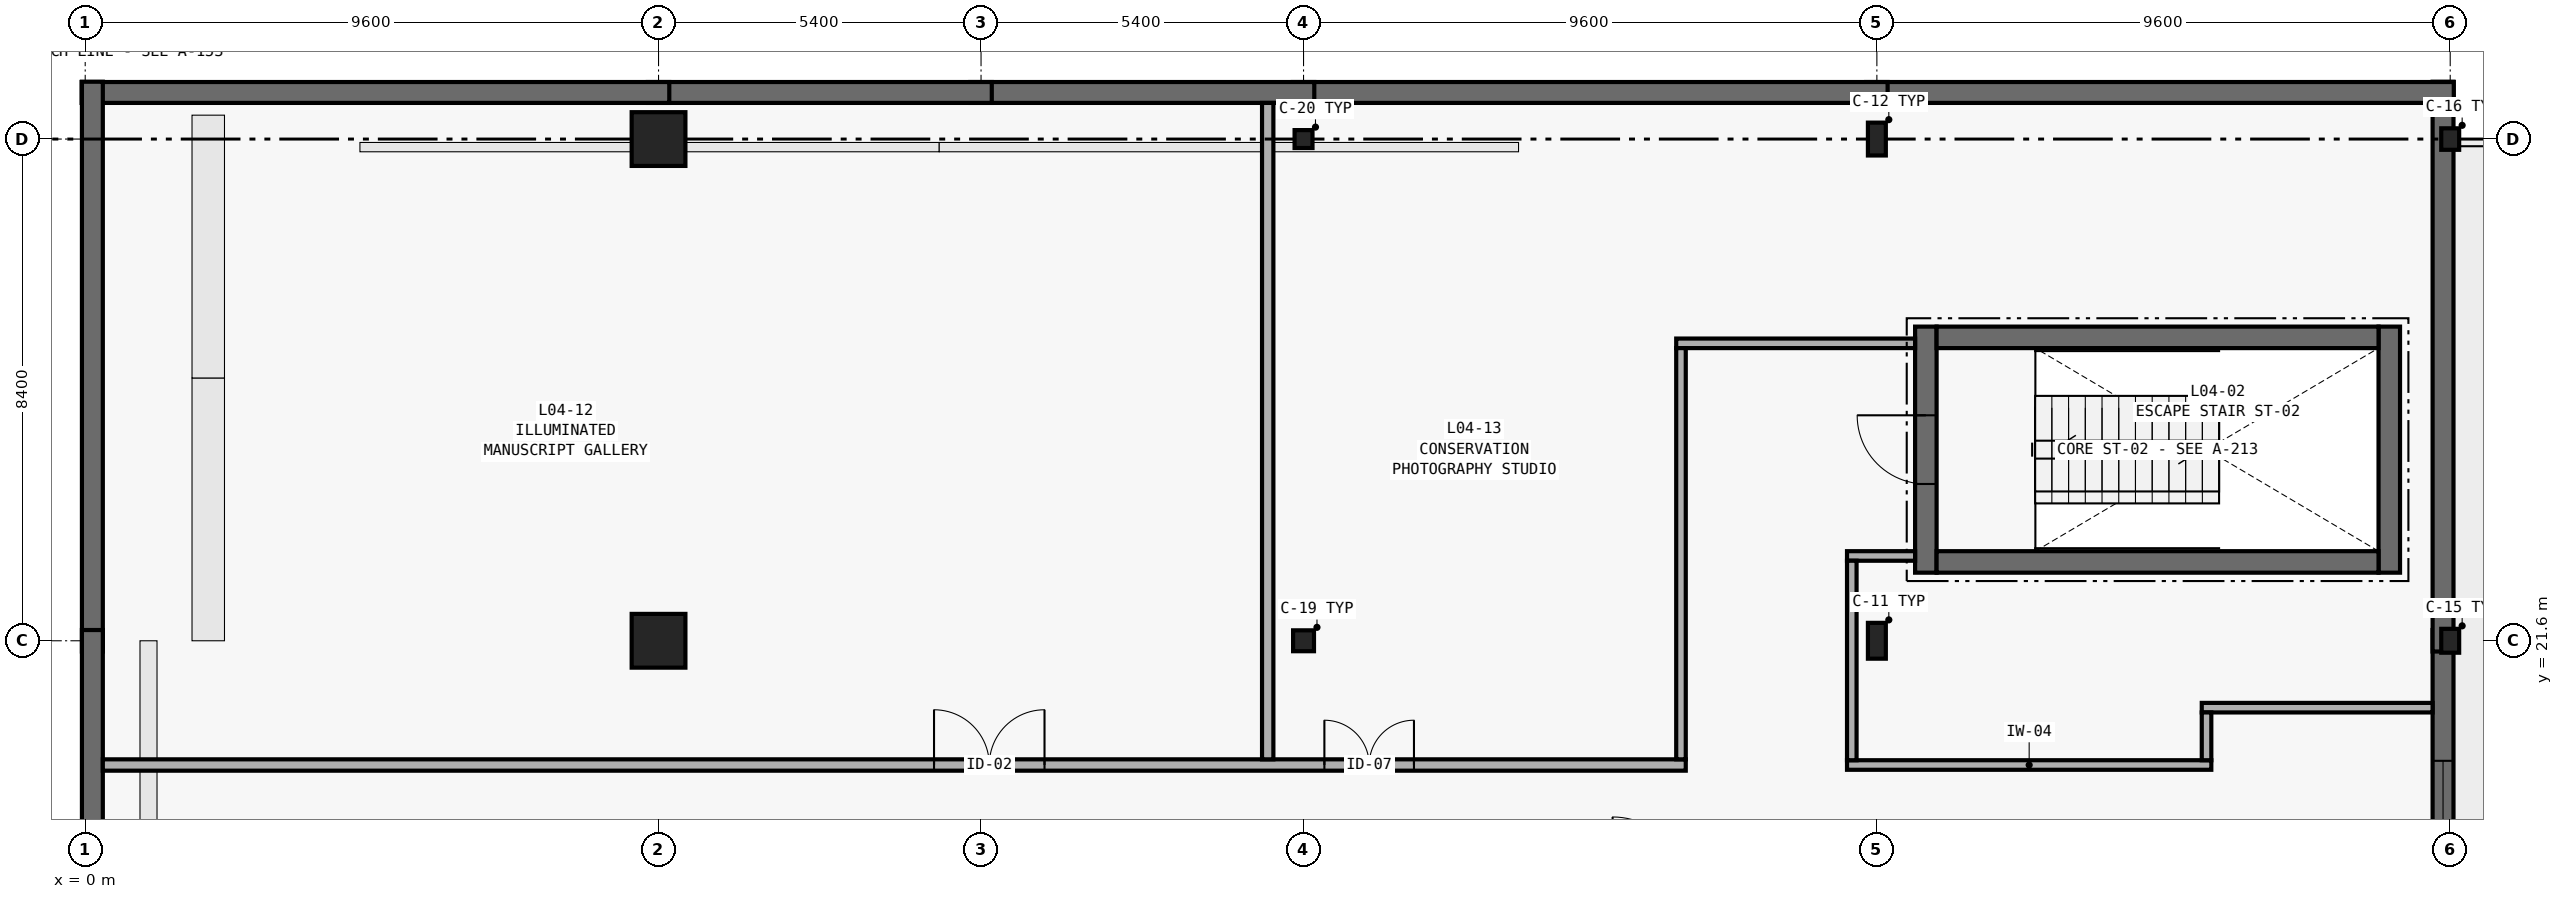
"""IFC4 building model, lengths in metres.
Left out: names, types, materials, properties, quantities, classifications, styles, units other than length and angle.
Written with IfcOpenShell. Run it as: python <this file> out.ifc"""

import sys

from ifc_helpers import new_model, si_unit, direction, frame, frame_2d, origin, origin_2d, place, context, subcontext, project, spatial, rectangle, hollow_rectangle, i_section, extrude, element, fill, save


model = new_model("IFC4")
c1 = context("Model", 3, precision=1e-05, world=origin(), true_north=direction((0.0, 1.0)))
c2 = subcontext(c1, "Body", "Model", "MODEL_VIEW")
j1 = project(units=[si_unit("LENGTHUNIT", "METRE"), si_unit("PLANEANGLEUNIT", "RADIAN")], contexts=[c1])
p1 = place(None, origin())
s1 = spatial("IfcSite", under=j1, at=p1, CompositionType="ELEMENT")
p2 = place(p1, origin())
s2 = spatial("IfcBuilding", under=s1, at=p2, CompositionType="ELEMENT")
p3 = place(p2, frame((0.0, 0.0, 21.3)))
s3 = spatial("IfcBuildingStorey", under=s2, at=p3, CompositionType="ELEMENT", Elevation=21.3)
for number, where, z_axis, x_axis in (
    (1, (9.6, 21.6, 0.0), (0.0, 0.0, 1.0), (1.0, 0.0, 0.0)),
    (2, (9.6, 30.0, 0.0), (0.0, 0.0, 1.0), (1.0, 0.0, 0.0)),
):
    element("IfcColumn", number, at=place(p3, frame(where, z_axis=z_axis, x_axis=x_axis)), inside=s3, PredefinedType="COLUMN", context=c2, shape_type="SweptSolid", body=[
        extrude(rectangle(XDim=0.9, YDim=0.9, at=origin_2d()), origin(), (0.0, 0.0, 1.0), 4.2),
    ])
p4 = place(p3, frame((20.4, 21.6, 0.0), z_axis=(0.0, 0.0, 1.0), x_axis=(1.0, 0.0, 0.0)))
e3 = element("IfcColumn", 3, at=p4, inside=s3, PredefinedType="COLUMN", context=c2, shape_type="SweptSolid", body=[
    extrude(hollow_rectangle(XDim=0.35, YDim=0.35, WallThickness=0.016, at=origin_2d()), origin(), (0.0, 0.0, 1.0), 4.2),
])
p5 = place(p3, frame((20.4, 30.0, 0.0), z_axis=(0.0, 0.0, 1.0), x_axis=(1.0, 0.0, 0.0)))
e4 = element("IfcColumn", 4, at=p5, inside=s3, PredefinedType="COLUMN", context=c2, shape_type="SweptSolid", body=[
    extrude(hollow_rectangle(XDim=0.3, YDim=0.3, WallThickness=0.016, at=origin_2d()), origin(), (0.0, 0.0, 1.0), 4.2),
])
p6 = place(p3, frame((30.0, 21.6, 0.0), z_axis=(0.0, 0.0, 1.0), x_axis=(1.0, 0.0, 0.0)))
e5 = element("IfcColumn", 5, at=p6, inside=s3, PredefinedType="COLUMN", context=c2, shape_type="SweptSolid", body=[
    extrude(i_section(OverallWidth=0.3, OverallDepth=0.6, WebThickness=0.015, FlangeThickness=0.03, FilletRadius=0.027, at=origin_2d()), origin(), (0.0, 0.0, 1.0), 4.2),
])
p7 = place(p3, frame((30.0, 30.0, 0.0), z_axis=(0.0, 0.0, 1.0), x_axis=(1.0, 0.0, 0.0)))
e6 = element("IfcColumn", 6, at=p7, inside=s3, PredefinedType="COLUMN", context=c2, shape_type="SweptSolid", body=[
    extrude(i_section(OverallWidth=0.3, OverallDepth=0.55, WebThickness=0.015, FlangeThickness=0.029, FilletRadius=0.027, at=origin_2d()), origin(), (0.0, 0.0, 1.0), 4.2),
])
p8 = place(p3, frame((39.6, 21.6, 0.0), z_axis=(0.0, 0.0, 1.0), x_axis=(1.0, 0.0, 0.0)))
e7 = element("IfcColumn", 7, at=p8, inside=s3, PredefinedType="COLUMN", context=c2, shape_type="SweptSolid", body=[
    extrude(i_section(OverallWidth=0.3, OverallDepth=0.4, WebThickness=0.013, FlangeThickness=0.024, FilletRadius=0.027, at=origin_2d()), origin(), (0.0, 0.0, 1.0), 4.2),
])
p9 = place(p3, frame((39.6, 30.0, 0.0), z_axis=(0.0, 0.0, 1.0), x_axis=(1.0, 0.0, 0.0)))
e8 = element("IfcColumn", 8, at=p9, inside=s3, PredefinedType="COLUMN", context=c2, shape_type="SweptSolid", body=[
    extrude(i_section(OverallWidth=0.3, OverallDepth=0.36, WebThickness=0.012, FlangeThickness=0.022, FilletRadius=0.027, at=origin_2d()), origin(), (0.0, 0.0, 1.0), 4.2),
])
p10 = place(p3, frame((39.48, 9.42, 0.0), z_axis=(0.0, 0.0, 1.0), x_axis=(0.0, 1.0, 0.0)))
e9 = element("IfcWall", 9, at=p10, inside=s3, PredefinedType="STANDARD", context=c2, shape_type="SweptSolid", body=[
    extrude(rectangle(XDim=12.36, YDim=0.35, at=frame_2d((6.18, 0.0))), origin(), (0.0, 0.0, 1.0), 3.9),
])
p11 = place(p10, frame((3.69, 0.0, 0.9)))
e10 = element("IfcOpeningElement", 10, at=p11, cuts=e9, PredefinedType="OPENING", context=c2, shape_type="SweptSolid", body=[
    extrude(rectangle(XDim=1.8, YDim=1.1, at=frame_2d((0.9, 0.55))), frame((0.0, 0.19, 0.0), z_axis=(0.0, -1.0, 0.0), x_axis=(1.0, 0.0, 0.0)), (0.0, 0.0, 1.0), 0.38),
])
p12 = place(p10, frame((8.37, 0.0, 0.9)))
e11 = element("IfcOpeningElement", 11, at=p12, cuts=e9, PredefinedType="OPENING", context=c2, shape_type="SweptSolid", body=[
    extrude(rectangle(XDim=1.8, YDim=1.1, at=frame_2d((0.9, 0.55))), frame((0.0, 0.19, 0.0), z_axis=(0.0, -1.0, 0.0), x_axis=(1.0, 0.0, 0.0)), (0.0, 0.0, 1.0), 0.38),
])
p13 = place(p3, frame((39.48, 21.42, 0.0), z_axis=(0.0, 0.0, 1.0), x_axis=(0.0, 1.0, 0.0)))
e12 = element("IfcWall", 12, at=p13, inside=s3, PredefinedType="STANDARD", context=c2, shape_type="SweptSolid", body=[
    extrude(rectangle(XDim=9.54, YDim=0.35, at=frame_2d((4.77, 0.0))), origin(), (0.0, 0.0, 1.0), 3.9),
])
p14 = place(p3, frame((39.66, 30.78, 0.0), z_axis=(0.0, 0.0, 1.0), x_axis=(-1.0, 0.0, 0.0)))
e13 = element("IfcWall", 13, at=p14, inside=s3, PredefinedType="STANDARD", context=c2, shape_type="SweptSolid", body=[
    extrude(rectangle(XDim=9.84, YDim=0.35, at=frame_2d((4.92, 0.0))), origin(), (0.0, 0.0, 1.0), 3.9),
])
p15 = place(p3, frame((30.18, 30.78, 0.0), z_axis=(0.0, 0.0, 1.0), x_axis=(-1.0, 0.0, 0.0)))
e14 = element("IfcWall", 14, at=p15, inside=s3, PredefinedType="STANDARD", context=c2, shape_type="SweptSolid", body=[
    extrude(rectangle(XDim=9.96, YDim=0.35, at=frame_2d((4.98, 0.0))), origin(), (0.0, 0.0, 1.0), 3.9),
])
for number, where, z_axis, x_axis in (
    (15, (20.58, 30.78, 0.0), (0.0, 0.0, 1.0), (-1.0, 0.0, 0.0)),
    (16, (15.18, 30.78, 0.0), (0.0, 0.0, 1.0), (-1.0, 0.0, 0.0)),
):
    element("IfcWall", number, at=place(p3, frame(where, z_axis=z_axis, x_axis=x_axis)), inside=s3, PredefinedType="STANDARD", context=c2, shape_type="SweptSolid", body=[
        extrude(rectangle(XDim=5.76, YDim=0.35, at=frame_2d((2.88, 0.0))), origin(), (0.0, 0.0, 1.0), 3.9),
    ])
p16 = place(p3, frame((9.78, 30.78, 0.0), z_axis=(0.0, 0.0, 1.0), x_axis=(-1.0, 0.0, 0.0)))
e17 = element("IfcWall", 17, at=p16, inside=s3, PredefinedType="STANDARD", context=c2, shape_type="SweptSolid", body=[
    extrude(rectangle(XDim=9.84, YDim=0.35, at=frame_2d((4.92, 0.0))), origin(), (0.0, 0.0, 1.0), 3.9),
])
p17 = place(p3, frame((0.12, 30.96, 0.0), z_axis=(0.0, 0.0, 1.0), x_axis=(0.0, -1.0, 0.0)))
e18 = element("IfcWall", 18, at=p17, inside=s3, PredefinedType="STANDARD", context=c2, shape_type="SweptSolid", body=[
    extrude(rectangle(XDim=9.54, YDim=0.35, at=frame_2d((4.77, 0.0))), origin(), (0.0, 0.0, 1.0), 3.9),
])
p18 = place(p3, frame((0.12, 21.78, 0.0), z_axis=(0.0, 0.0, 1.0), x_axis=(0.0, -1.0, 0.0)))
e19 = element("IfcWall", 19, at=p18, inside=s3, PredefinedType="STANDARD", context=c2, shape_type="SweptSolid", body=[
    extrude(rectangle(XDim=12.36, YDim=0.35, at=frame_2d((6.18, 0.0))), origin(), (0.0, 0.0, 1.0), 3.9),
])
p19 = place(p3, frame((30.82, 22.74, 0.0), z_axis=(0.0, 0.0, 1.0), x_axis=(0.0, 1.0, 0.0)))
e20 = element("IfcWall", 20, at=p19, inside=s3, PredefinedType="SHEAR", context=c2, shape_type="SweptSolid", body=[
    extrude(rectangle(XDim=4.12, YDim=0.36, at=frame_2d((2.06, 0.0))), origin(), (0.0, 0.0, 1.0), 3.95),
])
p20 = place(p19, frame((1.485, 0.0, 0.0)))
e21 = element("IfcOpeningElement", 21, at=p20, cuts=e20, PredefinedType="OPENING", context=c2, shape_type="SweptSolid", body=[
    extrude(rectangle(XDim=1.15, YDim=2.15, at=frame_2d((0.575, 1.075))), frame((0.0, 0.195, 0.0), z_axis=(0.0, -1.0, 0.0), x_axis=(1.0, 0.0, 0.0)), (0.0, 0.0, 1.0), 0.39),
])
p21 = place(p3, frame((38.58, 22.74, 0.0), z_axis=(0.0, 0.0, 1.0), x_axis=(0.0, 1.0, 0.0)))
e22 = element("IfcWall", 22, at=p21, inside=s3, PredefinedType="SHEAR", context=c2, shape_type="SweptSolid", body=[
    extrude(rectangle(XDim=4.12, YDim=0.36, at=frame_2d((2.06, 0.0))), origin(), (0.0, 0.0, 1.0), 3.95),
])
for number, where, z_axis, x_axis in (
    (23, (31.0, 26.68, 0.0), (0.0, 0.0, 1.0), (1.0, 0.0, 0.0)),
    (24, (31.0, 22.92, 0.0), (0.0, 0.0, 1.0), (1.0, 0.0, 0.0)),
):
    element("IfcWall", number, at=place(p3, frame(where, z_axis=z_axis, x_axis=x_axis)), inside=s3, PredefinedType="SHEAR", context=c2, shape_type="SweptSolid", body=[
        extrude(rectangle(XDim=7.4, YDim=0.36, at=frame_2d((3.7, 0.0))), origin(), (0.0, 0.0, 1.0), 3.95),
    ])
p22 = place(p3, frame((0.295, 19.52, 0.0), z_axis=(0.0, 0.0, 1.0), x_axis=(1.0, 0.0, 0.0)))
e25 = element("IfcWall", 25, at=p22, inside=s3, PredefinedType="PARTITIONING", context=c2, shape_type="SweptSolid", body=[
    extrude(rectangle(XDim=26.505, YDim=0.19, at=frame_2d((13.252, 0.0))), origin(), (0.0, 0.0, 1.0), 2.83),
])
p23 = place(p22, frame((13.918, 0.0, 0.0)))
e26 = element("IfcOpeningElement", 26, at=p23, cuts=e25, PredefinedType="OPENING", context=c2, shape_type="SweptSolid", body=[
    extrude(rectangle(XDim=1.85, YDim=2.35, at=frame_2d((0.925, 1.175))), frame((0.0, 0.11, 0.0), z_axis=(0.0, -1.0, 0.0), x_axis=(1.0, 0.0, 0.0)), (0.0, 0.0, 1.0), 0.22),
])
p24 = place(p22, frame((20.454, 0.0, 0.0)))
e27 = element("IfcOpeningElement", 27, at=p24, cuts=e25, PredefinedType="OPENING", context=c2, shape_type="SweptSolid", body=[
    extrude(rectangle(XDim=1.5, YDim=2.2, at=frame_2d((0.75, 1.1))), frame((0.0, 0.11, 0.0), z_axis=(0.0, -1.0, 0.0), x_axis=(1.0, 0.0, 0.0)), (0.0, 0.0, 1.0), 0.22),
])
p25 = place(p3, frame((29.5, 19.52, 0.0), z_axis=(0.0, 0.0, 1.0), x_axis=(1.0, 0.0, 0.0)))
e28 = element("IfcWall", 28, at=p25, inside=s3, PredefinedType="PARTITIONING", context=c2, shape_type="SweptSolid", body=[
    extrude(rectangle(XDim=6.1, YDim=0.16, at=frame_2d((3.05, 0.0))), origin(), (0.0, 0.0, 1.0), 2.83),
])
p26 = place(p3, frame((35.44, 20.48, 0.0), z_axis=(0.0, 0.0, 1.0), x_axis=(1.0, 0.0, 0.0)))
e29 = element("IfcWall", 29, at=p26, inside=s3, PredefinedType="PARTITIONING", context=c2, shape_type="SweptSolid", body=[
    extrude(rectangle(XDim=3.865, YDim=0.16, at=frame_2d((1.933, 0.0))), origin(), (0.0, 0.0, 1.0), 2.83),
])
p27 = place(p3, frame((29.5, 23.02, 0.0), z_axis=(0.0, 0.0, 1.0), x_axis=(1.0, 0.0, 0.0)))
e30 = element("IfcWall", 30, at=p27, inside=s3, PredefinedType="PARTITIONING", context=c2, shape_type="SweptSolid", body=[
    extrude(rectangle(XDim=1.14, YDim=0.16, at=frame_2d((0.57, 0.0))), origin(), (0.0, 0.0, 1.0), 2.83),
])
p28 = place(p3, frame((26.64, 26.58, 0.0), z_axis=(0.0, 0.0, 1.0), x_axis=(1.0, 0.0, 0.0)))
e31 = element("IfcWall", 31, at=p28, inside=s3, PredefinedType="PARTITIONING", context=c2, shape_type="SweptSolid", body=[
    extrude(rectangle(XDim=4.0, YDim=0.16, at=frame_2d((2.0, 0.0))), origin(), (0.0, 0.0, 1.0), 2.83),
])
p29 = place(p3, frame((19.8, 19.615, 0.0), z_axis=(0.0, 0.0, 1.0), x_axis=(0.0, 1.0, 0.0)))
e32 = element("IfcWall", 32, at=p29, inside=s3, PredefinedType="PARTITIONING", context=c2, shape_type="SweptSolid", body=[
    extrude(rectangle(XDim=10.99, YDim=0.19, at=frame_2d((5.495, 0.0))), origin(), (0.0, 0.0, 1.0), 2.83),
])
p30 = place(p3, frame((26.72, 19.615, 0.0), z_axis=(0.0, 0.0, 1.0), x_axis=(0.0, 1.0, 0.0)))
e33 = element("IfcWall", 33, at=p30, inside=s3, PredefinedType="PARTITIONING", context=c2, shape_type="SweptSolid", body=[
    extrude(rectangle(XDim=6.885, YDim=0.16, at=frame_2d((3.442, 0.0))), origin(), (0.0, 0.0, 1.0), 2.83),
])
p31 = place(p3, frame((29.58, 19.6, 0.0), z_axis=(0.0, 0.0, 1.0), x_axis=(0.0, 1.0, 0.0)))
e34 = element("IfcWall", 34, at=p31, inside=s3, PredefinedType="PARTITIONING", context=c2, shape_type="SweptSolid", body=[
    extrude(rectangle(XDim=3.34, YDim=0.16, at=frame_2d((1.67, 0.0))), origin(), (0.0, 0.0, 1.0), 2.83),
])
p32 = place(p3, frame((35.52, 19.6, 0.0), z_axis=(0.0, 0.0, 1.0), x_axis=(0.0, 1.0, 0.0)))
e35 = element("IfcWall", 35, at=p32, inside=s3, PredefinedType="PARTITIONING", context=c2, shape_type="SweptSolid", body=[
    extrude(rectangle(XDim=0.8, YDim=0.16, at=frame_2d((0.4, 0.0))), origin(), (0.0, 0.0, 1.0), 2.83),
])
p33 = place(p12, origin())
e36 = element("IfcWindow", 36, at=p33, inside=s3, PartitioningType="SINGLE_PANEL", PredefinedType="WINDOW", context=c2, shape_type="SweptSolid", body=[
    extrude(rectangle(XDim=1.8, YDim=1.1, at=frame_2d((0.9, 0.55))), frame((0.0, 0.03, 0.0), z_axis=(0.0, -1.0, 0.0), x_axis=(1.0, 0.0, 0.0)), (0.0, 0.0, 1.0), 0.06),
])
fill(e11, e36)
p34 = place(p20, origin())
e37 = element("IfcDoor", 37, at=p34, inside=s3, OperationType="SINGLE_SWING_RIGHT", PredefinedType="DOOR", context=c2, shape_type="SweptSolid", body=[
    extrude(rectangle(XDim=1.15, YDim=2.15, at=frame_2d((0.575, 1.075))), frame((0.0, 0.025, 0.0), z_axis=(0.0, -1.0, 0.0), x_axis=(1.0, 0.0, 0.0)), (0.0, 0.0, 1.0), 0.05),
])
fill(e21, e37)
p35 = place(p23, origin())
e38 = element("IfcDoor", 38, at=p35, inside=s3, OperationType="DOUBLE_DOOR_SINGLE_SWING", PredefinedType="DOOR", context=c2, shape_type="SweptSolid", body=[
    extrude(rectangle(XDim=1.85, YDim=2.35, at=frame_2d((0.925, 1.175))), frame((0.0, 0.025, 0.0), z_axis=(0.0, -1.0, 0.0), x_axis=(1.0, 0.0, 0.0)), (0.0, 0.0, 1.0), 0.05),
])
fill(e26, e38)
p36 = place(p24, origin())
e39 = element("IfcDoor", 39, at=p36, inside=s3, OperationType="DOUBLE_DOOR_SINGLE_SWING", PredefinedType="DOOR", context=c2, shape_type="SweptSolid", body=[
    extrude(rectangle(XDim=1.5, YDim=2.2, at=frame_2d((0.75, 1.1))), frame((0.0, 0.025, 0.0), z_axis=(0.0, -1.0, 0.0), x_axis=(1.0, 0.0, 0.0)), (0.0, 0.0, 1.0), 0.05),
])
fill(e27, e39)
save(model, sys.argv[1])
